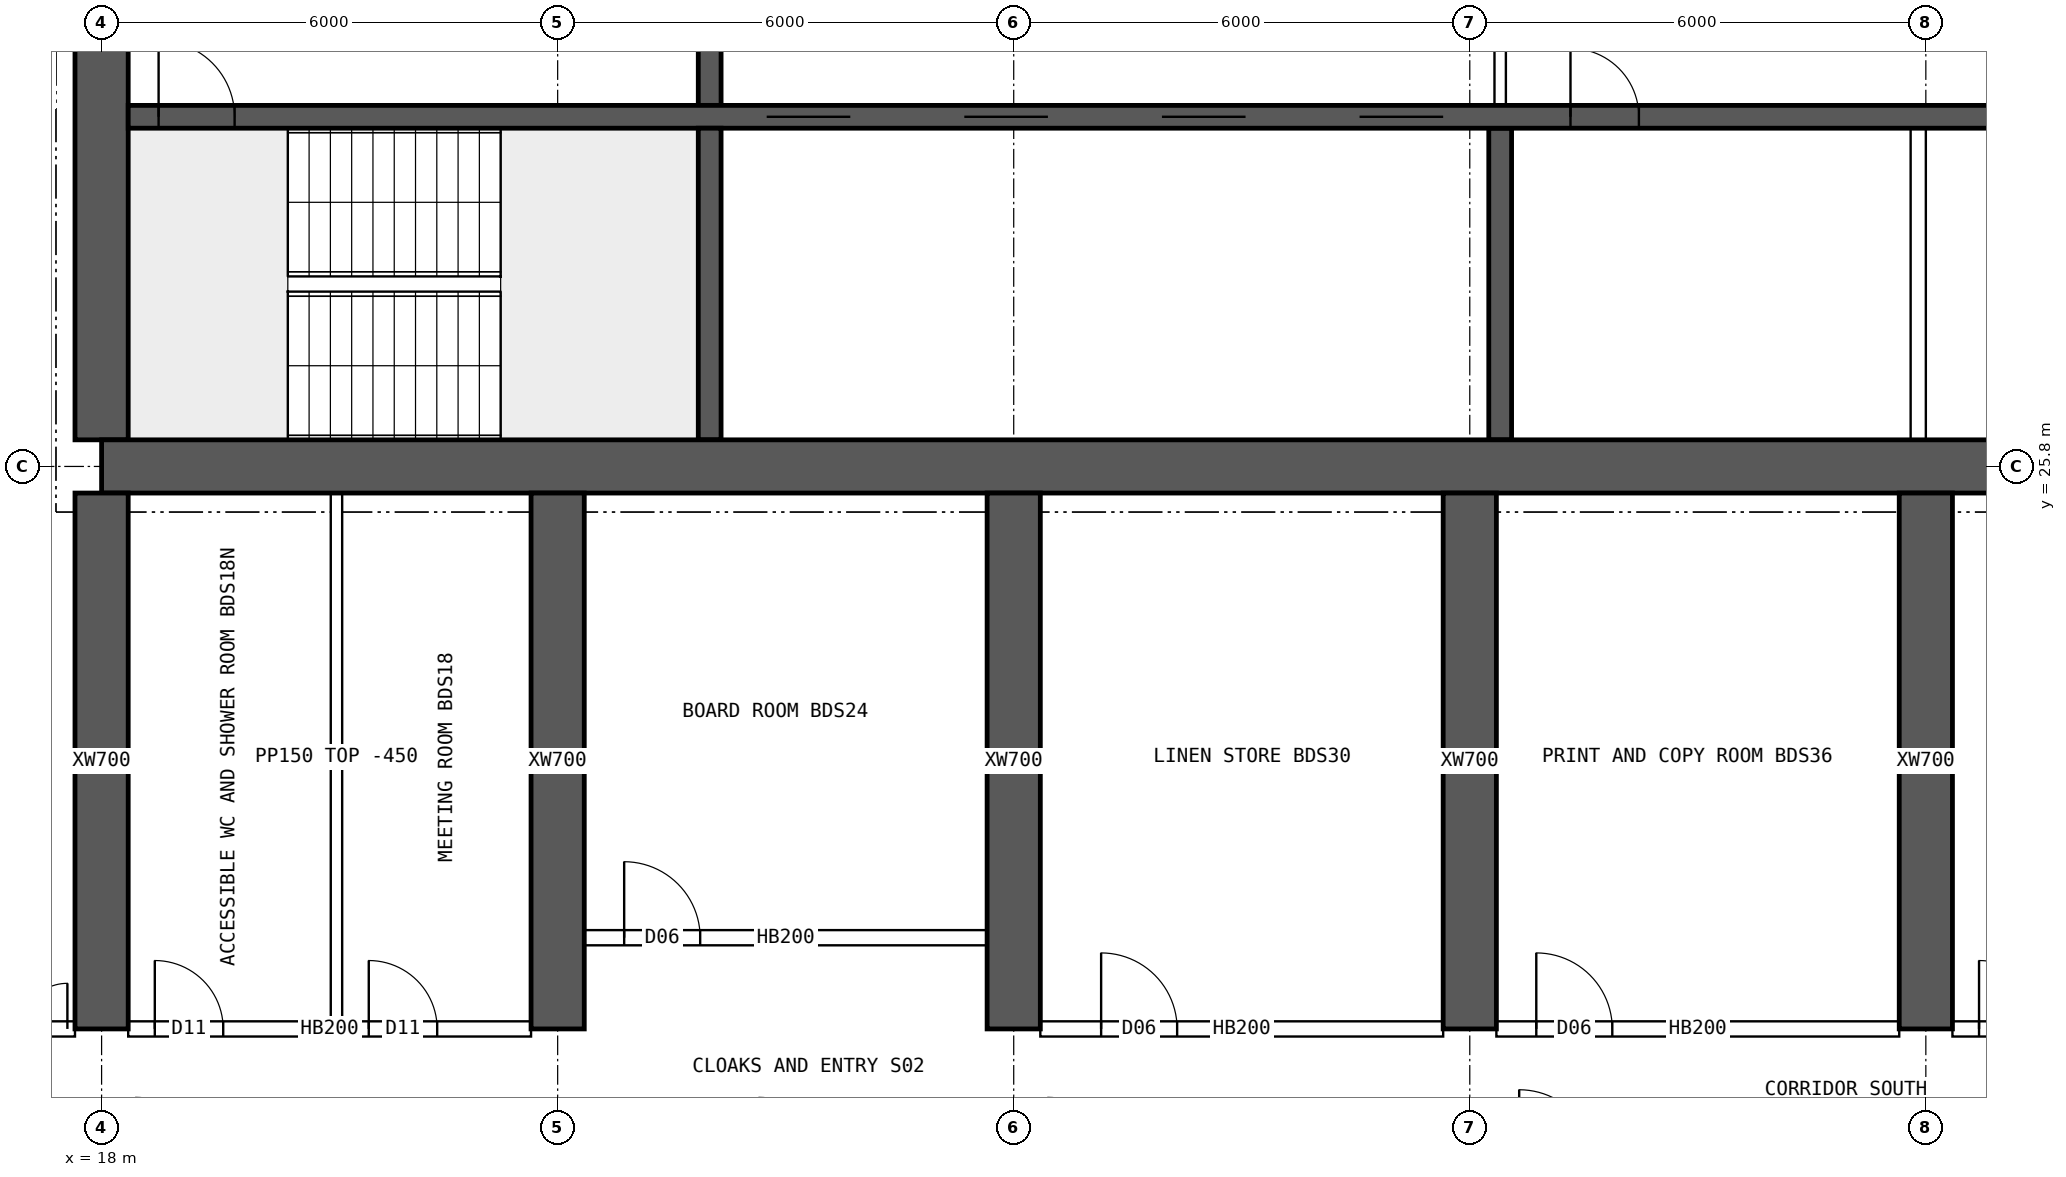
"""IFC4 building model, lengths in metres.
Left out: names, types, materials, properties, quantities, classifications, styles, units other than length and angle.
Written with IfcOpenShell. Run it as: python <this file> out.ifc"""

import sys

from ifc_helpers import new_model, si_unit, direction, frame, frame_2d, origin, place, context, subcontext, project, spatial, rectangle, extrude, element, fill, save


model = new_model("IFC4")
c1 = context("Model", 3, precision=1e-05, world=origin(), true_north=direction((0.0, 1.0)))
c2 = subcontext(c1, "Body", "Model", "MODEL_VIEW")
j1 = project(units=[si_unit("LENGTHUNIT", "METRE"), si_unit("PLANEANGLEUNIT", "RADIAN")], contexts=[c1])
p1 = place(None, origin())
s1 = spatial("IfcSite", under=j1, at=p1, CompositionType="ELEMENT")
p2 = place(p1, origin())
s2 = spatial("IfcBuilding", under=s1, at=p2, CompositionType="ELEMENT")
p3 = place(p2, frame((0.0, 0.0, 212.8)))
s3 = spatial("IfcBuildingStorey", under=s2, at=p3, CompositionType="ELEMENT", Elevation=212.8)
p4 = place(p3, frame((18.0, 25.8, 0.0), z_axis=(0.0, 0.0, 1.0), x_axis=(1.0, 0.0, 0.0)))
e1 = element("IfcWall", 1, at=p4, inside=s3, PredefinedType="SHEAR", context=c2, shape_type="SweptSolid", body=[
    extrude(rectangle(XDim=48.0, YDim=0.7, at=frame_2d((24.0, 0.0))), origin(), (0.0, 0.0, 1.0), 3.75),
])
p5 = place(p3, frame((18.0, 26.15, 0.0), z_axis=(0.0, 0.0, 1.0), x_axis=(0.0, 1.0, 0.0)))
e2 = element("IfcWall", 2, at=p5, inside=s3, PredefinedType="SHEAR", context=c2, shape_type="SweptSolid", body=[
    extrude(rectangle(XDim=11.7, YDim=0.7, at=frame_2d((5.85, 0.0))), origin(), (0.0, 0.0, 1.0), 3.75),
])
p6 = place(p5, frame((5.15, 0.0, 0.0)))
e3 = element("IfcOpeningElement", 3, at=p6, cuts=e2, PredefinedType="OPENING", context=c2, shape_type="SweptSolid", body=[
    extrude(rectangle(XDim=1.2, YDim=2.1, at=frame_2d((0.6, 1.05))), frame((0.0, 0.36, 0.0), z_axis=(0.0, -1.0, 0.0), x_axis=(1.0, 0.0, 0.0)), (0.0, 0.0, 1.0), 0.72),
])
p7 = place(p3, frame((18.35, 30.4, 0.0), z_axis=(0.0, 0.0, 1.0), x_axis=(1.0, 0.0, 0.0)))
e4 = element("IfcWall", 4, at=p7, inside=s3, PredefinedType="SHEAR", context=c2, shape_type="SweptSolid", body=[
    extrude(rectangle(XDim=47.3, YDim=0.3, at=frame_2d((23.65, 0.0))), origin(), (0.0, 0.0, 1.0), 3.75),
])
p8 = place(p7, frame((0.4, 0.0, 0.0)))
e5 = element("IfcOpeningElement", 5, at=p8, cuts=e4, PredefinedType="OPENING", context=c2, shape_type="SweptSolid", body=[
    extrude(rectangle(XDim=1.0, YDim=2.1, at=frame_2d((0.5, 1.05))), frame((0.0, 0.16, 0.0), z_axis=(0.0, -1.0, 0.0), x_axis=(1.0, 0.0, 0.0)), (0.0, 0.0, 1.0), 0.32),
])
p9 = place(p7, frame((45.9, 0.0, 0.0)))
e6 = element("IfcOpeningElement", 6, at=p9, cuts=e4, PredefinedType="OPENING", context=c2, shape_type="SweptSolid", body=[
    extrude(rectangle(XDim=1.0, YDim=2.1, at=frame_2d((0.5, 1.05))), frame((0.0, 0.16, 0.0), z_axis=(0.0, -1.0, 0.0), x_axis=(1.0, 0.0, 0.0)), (0.0, 0.0, 1.0), 0.32),
])
p10 = place(p7, frame((8.4, 0.0, 0.0)))
e7 = element("IfcOpeningElement", 7, at=p10, cuts=e4, PredefinedType="OPENING", context=c2, shape_type="SweptSolid", body=[
    extrude(rectangle(XDim=1.1, YDim=2.1, at=frame_2d((0.55, 1.05))), frame((0.0, 0.16, 0.0), z_axis=(0.0, -1.0, 0.0), x_axis=(1.0, 0.0, 0.0)), (0.0, 0.0, 1.0), 0.32),
])
p11 = place(p7, frame((11.0, 0.0, 0.0)))
e8 = element("IfcOpeningElement", 8, at=p11, cuts=e4, PredefinedType="OPENING", context=c2, shape_type="SweptSolid", body=[
    extrude(rectangle(XDim=1.1, YDim=2.1, at=frame_2d((0.55, 1.05))), frame((0.0, 0.16, 0.0), z_axis=(0.0, -1.0, 0.0), x_axis=(1.0, 0.0, 0.0)), (0.0, 0.0, 1.0), 0.32),
])
p12 = place(p7, frame((13.6, 0.0, 0.0)))
e9 = element("IfcOpeningElement", 9, at=p12, cuts=e4, PredefinedType="OPENING", context=c2, shape_type="SweptSolid", body=[
    extrude(rectangle(XDim=1.1, YDim=2.1, at=frame_2d((0.55, 1.05))), frame((0.0, 0.16, 0.0), z_axis=(0.0, -1.0, 0.0), x_axis=(1.0, 0.0, 0.0)), (0.0, 0.0, 1.0), 0.32),
])
p13 = place(p7, frame((16.2, 0.0, 0.0)))
e10 = element("IfcOpeningElement", 10, at=p13, cuts=e4, PredefinedType="OPENING", context=c2, shape_type="SweptSolid", body=[
    extrude(rectangle(XDim=1.1, YDim=2.1, at=frame_2d((0.55, 1.05))), frame((0.0, 0.16, 0.0), z_axis=(0.0, -1.0, 0.0), x_axis=(1.0, 0.0, 0.0)), (0.0, 0.0, 1.0), 0.32),
])
p14 = place(p7, frame((18.975, 0.0, 0.0)))
e11 = element("IfcOpeningElement", 11, at=p14, cuts=e4, PredefinedType="OPENING", context=c2, shape_type="SweptSolid", body=[
    extrude(rectangle(XDim=0.9, YDim=2.1, at=frame_2d((0.45, 1.05))), frame((0.0, 0.16, 0.0), z_axis=(0.0, -1.0, 0.0), x_axis=(1.0, 0.0, 0.0)), (0.0, 0.0, 1.0), 0.32),
])
p15 = place(p7, frame((30.267, 0.0, 0.0)))
e12 = element("IfcOpeningElement", 12, at=p15, cuts=e4, PredefinedType="OPENING", context=c2, shape_type="SweptSolid", body=[
    extrude(rectangle(XDim=1.1, YDim=2.1, at=frame_2d((0.55, 1.05))), frame((0.0, 0.16, 0.0), z_axis=(0.0, -1.0, 0.0), x_axis=(1.0, 0.0, 0.0)), (0.0, 0.0, 1.0), 0.32),
])
p16 = place(p7, frame((33.8, 0.0, 0.0)))
e13 = element("IfcOpeningElement", 13, at=p16, cuts=e4, PredefinedType="OPENING", context=c2, shape_type="SweptSolid", body=[
    extrude(rectangle(XDim=1.1, YDim=2.1, at=frame_2d((0.55, 1.05))), frame((0.0, 0.16, 0.0), z_axis=(0.0, -1.0, 0.0), x_axis=(1.0, 0.0, 0.0)), (0.0, 0.0, 1.0), 0.32),
])
p17 = place(p7, frame((37.333, 0.0, 0.0)))
e14 = element("IfcOpeningElement", 14, at=p17, cuts=e4, PredefinedType="OPENING", context=c2, shape_type="SweptSolid", body=[
    extrude(rectangle(XDim=1.1, YDim=2.1, at=frame_2d((0.55, 1.05))), frame((0.0, 0.16, 0.0), z_axis=(0.0, -1.0, 0.0), x_axis=(1.0, 0.0, 0.0)), (0.0, 0.0, 1.0), 0.32),
])
p18 = place(p3, frame((26.0, 26.15, 0.0), z_axis=(0.0, 0.0, 1.0), x_axis=(0.0, 1.0, 0.0)))
e15 = element("IfcWall", 15, at=p18, inside=s3, PredefinedType="SHEAR", context=c2, shape_type="SweptSolid", body=[
    extrude(rectangle(XDim=4.1, YDim=0.3, at=frame_2d((2.05, 0.0))), origin(), (0.0, 0.0, 1.0), 3.75),
])
p19 = place(p3, frame((26.0, 30.55, 0.0), z_axis=(0.0, 0.0, 1.0), x_axis=(0.0, 1.0, 0.0)))
e16 = element("IfcWall", 16, at=p19, inside=s3, PredefinedType="SHEAR", context=c2, shape_type="SweptSolid", body=[
    extrude(rectangle(XDim=3.9, YDim=0.3, at=frame_2d((1.95, 0.0))), origin(), (0.0, 0.0, 1.0), 3.75),
])
p20 = place(p19, frame((1.4, 0.0, 0.0)))
e17 = element("IfcOpeningElement", 17, at=p20, cuts=e16, PredefinedType="OPENING", context=c2, shape_type="SweptSolid", body=[
    extrude(rectangle(XDim=1.2, YDim=2.1, at=frame_2d((0.6, 1.05))), frame((0.0, 0.16, 0.0), z_axis=(0.0, -1.0, 0.0), x_axis=(1.0, 0.0, 0.0)), (0.0, 0.0, 1.0), 0.32),
])
p21 = place(p3, frame((36.4, 26.15, 0.0), z_axis=(0.0, 0.0, 1.0), x_axis=(0.0, 1.0, 0.0)))
e18 = element("IfcWall", 18, at=p21, inside=s3, PredefinedType="SHEAR", context=c2, shape_type="SweptSolid", body=[
    extrude(rectangle(XDim=4.1, YDim=0.3, at=frame_2d((2.05, 0.0))), origin(), (0.0, 0.0, 1.0), 3.75),
])
for number, where, z_axis, x_axis in (
    (19, (18.0, 18.4, 0.0), (0.0, 0.0, 1.0), (0.0, 1.0, 0.0)),
    (20, (24.0, 18.4, 0.0), (0.0, 0.0, 1.0), (0.0, 1.0, 0.0)),
    (21, (30.0, 18.4, 0.0), (0.0, 0.0, 1.0), (0.0, 1.0, 0.0)),
    (22, (36.0, 18.4, 0.0), (0.0, 0.0, 1.0), (0.0, 1.0, 0.0)),
    (23, (42.0, 18.4, 0.0), (0.0, 0.0, 1.0), (0.0, 1.0, 0.0)),
):
    element("IfcWall", number, at=place(p3, frame(where, z_axis=z_axis, x_axis=x_axis)), inside=s3, PredefinedType="SHEAR", context=c2, shape_type="SweptSolid", body=[
        extrude(rectangle(XDim=7.05, YDim=0.7, at=frame_2d((3.525, 0.0))), origin(), (0.0, 0.0, 1.0), 3.75),
    ])
p22 = place(p3, frame((36.4, 30.55, 0.0), z_axis=(0.0, 0.0, 1.0), x_axis=(0.0, 1.0, 0.0)))
e24 = element("IfcWall", 24, at=p22, inside=s3, PredefinedType="SOLIDWALL", context=c2, shape_type="SweptSolid", body=[
    extrude(rectangle(XDim=3.9, YDim=0.15, at=frame_2d((1.95, 0.0))), origin(), (0.0, 0.0, 1.0), 3.3),
])
p23 = place(p22, frame((1.15, 0.0, 0.0)))
e25 = element("IfcOpeningElement", 25, at=p23, cuts=e24, PredefinedType="OPENING", context=c2, shape_type="SweptSolid", body=[
    extrude(rectangle(XDim=1.6, YDim=2.1, at=frame_2d((0.8, 1.05))), frame((0.0, 0.085, 0.0), z_axis=(0.0, -1.0, 0.0), x_axis=(1.0, 0.0, 0.0)), (0.0, 0.0, 1.0), 0.17),
])
p24 = place(p3, frame((41.9, 26.15, 0.0), z_axis=(0.0, 0.0, 1.0), x_axis=(0.0, 1.0, 0.0)))
e26 = element("IfcWall", 26, at=p24, inside=s3, PredefinedType="SOLIDWALL", context=c2, shape_type="SweptSolid", body=[
    extrude(rectangle(XDim=4.1, YDim=0.2, at=frame_2d((2.05, 0.0))), origin(), (0.0, 0.0, 1.0), 3.3),
])
p25 = place(p3, frame((15.6, 18.4, 0.0), z_axis=(0.0, 0.0, 1.0), x_axis=(1.0, 0.0, 0.0)))
e27 = element("IfcWall", 27, at=p25, inside=s3, PredefinedType="SOLIDWALL", context=c2, shape_type="SweptSolid", body=[
    extrude(rectangle(XDim=2.05, YDim=0.2, at=frame_2d((1.025, 0.0))), origin(), (0.0, 0.0, 1.0), 3.3),
])
p26 = place(p25, frame((0.75, 0.0, 0.0)))
e28 = element("IfcOpeningElement", 28, at=p26, cuts=e27, PredefinedType="OPENING", context=c2, shape_type="SweptSolid", body=[
    extrude(rectangle(XDim=1.2, YDim=2.1, at=frame_2d((0.6, 1.05))), frame((0.0, 0.11, 0.0), z_axis=(0.0, -1.0, 0.0), x_axis=(1.0, 0.0, 0.0)), (0.0, 0.0, 1.0), 0.22),
])
p27 = place(p3, frame((18.35, 18.4, 0.0), z_axis=(0.0, 0.0, 1.0), x_axis=(1.0, 0.0, 0.0)))
e29 = element("IfcWall", 29, at=p27, inside=s3, PredefinedType="SOLIDWALL", context=c2, shape_type="SweptSolid", body=[
    extrude(rectangle(XDim=5.3, YDim=0.2, at=frame_2d((2.65, 0.0))), origin(), (0.0, 0.0, 1.0), 3.3),
])
p28 = place(p27, frame((0.35, 0.0, 0.0)))
e30 = element("IfcOpeningElement", 30, at=p28, cuts=e29, PredefinedType="OPENING", context=c2, shape_type="SweptSolid", body=[
    extrude(rectangle(XDim=0.9, YDim=2.1, at=frame_2d((0.45, 1.05))), frame((0.0, 0.11, 0.0), z_axis=(0.0, -1.0, 0.0), x_axis=(1.0, 0.0, 0.0)), (0.0, 0.0, 1.0), 0.22),
])
p29 = place(p27, frame((3.165, 0.0, 0.0)))
e31 = element("IfcOpeningElement", 31, at=p29, cuts=e29, PredefinedType="OPENING", context=c2, shape_type="SweptSolid", body=[
    extrude(rectangle(XDim=0.9, YDim=2.1, at=frame_2d((0.45, 1.05))), frame((0.0, 0.11, 0.0), z_axis=(0.0, -1.0, 0.0), x_axis=(1.0, 0.0, 0.0)), (0.0, 0.0, 1.0), 0.22),
])
p30 = place(p3, frame((30.35, 18.4, 0.0), z_axis=(0.0, 0.0, 1.0), x_axis=(1.0, 0.0, 0.0)))
e32 = element("IfcWall", 32, at=p30, inside=s3, PredefinedType="SOLIDWALL", context=c2, shape_type="SweptSolid", body=[
    extrude(rectangle(XDim=5.3, YDim=0.2, at=frame_2d((2.65, 0.0))), origin(), (0.0, 0.0, 1.0), 3.3),
])
p31 = place(p30, frame((0.8, 0.0, 0.0)))
e33 = element("IfcOpeningElement", 33, at=p31, cuts=e32, PredefinedType="OPENING", context=c2, shape_type="SweptSolid", body=[
    extrude(rectangle(XDim=1.0, YDim=2.1, at=frame_2d((0.5, 1.05))), frame((0.0, 0.11, 0.0), z_axis=(0.0, -1.0, 0.0), x_axis=(1.0, 0.0, 0.0)), (0.0, 0.0, 1.0), 0.22),
])
p32 = place(p3, frame((36.35, 18.4, 0.0), z_axis=(0.0, 0.0, 1.0), x_axis=(1.0, 0.0, 0.0)))
e34 = element("IfcWall", 34, at=p32, inside=s3, PredefinedType="SOLIDWALL", context=c2, shape_type="SweptSolid", body=[
    extrude(rectangle(XDim=5.3, YDim=0.2, at=frame_2d((2.65, 0.0))), origin(), (0.0, 0.0, 1.0), 3.3),
])
p33 = place(p32, frame((0.525, 0.0, 0.0)))
e35 = element("IfcOpeningElement", 35, at=p33, cuts=e34, PredefinedType="OPENING", context=c2, shape_type="SweptSolid", body=[
    extrude(rectangle(XDim=1.0, YDim=2.1, at=frame_2d((0.5, 1.05))), frame((0.0, 0.11, 0.0), z_axis=(0.0, -1.0, 0.0), x_axis=(1.0, 0.0, 0.0)), (0.0, 0.0, 1.0), 0.22),
])
p34 = place(p3, frame((42.35, 18.4, 0.0), z_axis=(0.0, 0.0, 1.0), x_axis=(1.0, 0.0, 0.0)))
e36 = element("IfcWall", 36, at=p34, inside=s3, PredefinedType="SOLIDWALL", context=c2, shape_type="SweptSolid", body=[
    extrude(rectangle(XDim=5.3, YDim=0.2, at=frame_2d((2.65, 0.0))), origin(), (0.0, 0.0, 1.0), 3.3),
])
p35 = place(p34, frame((0.35, 0.0, 0.0)))
e37 = element("IfcOpeningElement", 37, at=p35, cuts=e36, PredefinedType="OPENING", context=c2, shape_type="SweptSolid", body=[
    extrude(rectangle(XDim=0.9, YDim=2.1, at=frame_2d((0.45, 1.05))), frame((0.0, 0.11, 0.0), z_axis=(0.0, -1.0, 0.0), x_axis=(1.0, 0.0, 0.0)), (0.0, 0.0, 1.0), 0.22),
])
p36 = place(p34, frame((2.655, 0.0, 0.0)))
e38 = element("IfcOpeningElement", 38, at=p36, cuts=e36, PredefinedType="OPENING", context=c2, shape_type="SweptSolid", body=[
    extrude(rectangle(XDim=0.9, YDim=2.1, at=frame_2d((0.45, 1.05))), frame((0.0, 0.11, 0.0), z_axis=(0.0, -1.0, 0.0), x_axis=(1.0, 0.0, 0.0)), (0.0, 0.0, 1.0), 0.22),
])
p37 = place(p3, frame((21.09, 18.5, 0.0), z_axis=(0.0, 0.0, 1.0), x_axis=(0.0, 1.0, 0.0)))
e39 = element("IfcWall", 39, at=p37, inside=s3, PredefinedType="PARTITIONING", context=c2, shape_type="SweptSolid", body=[
    extrude(rectangle(XDim=6.95, YDim=0.15, at=frame_2d((3.475, 0.0))), origin(), (0.0, 0.0, 1.0), 3.3),
])
p38 = place(p3, frame((24.35, 19.6, 0.0), z_axis=(0.0, 0.0, 1.0), x_axis=(1.0, 0.0, 0.0)))
e40 = element("IfcWall", 40, at=p38, inside=s3, PredefinedType="SOLIDWALL", context=c2, shape_type="SweptSolid", body=[
    extrude(rectangle(XDim=5.3, YDim=0.2, at=frame_2d((2.65, 0.0))), origin(), (0.0, 0.0, 1.0), 3.3),
])
p39 = place(p38, frame((0.525, 0.0, 0.0)))
e41 = element("IfcOpeningElement", 41, at=p39, cuts=e40, PredefinedType="OPENING", context=c2, shape_type="SweptSolid", body=[
    extrude(rectangle(XDim=1.0, YDim=2.1, at=frame_2d((0.5, 1.05))), frame((0.0, 0.11, 0.0), z_axis=(0.0, -1.0, 0.0), x_axis=(1.0, 0.0, 0.0)), (0.0, 0.0, 1.0), 0.22),
])
p40 = place(p8, origin())
e42 = element("IfcDoor", 42, at=p40, inside=s3, OperationType="SINGLE_SWING_LEFT", PredefinedType="DOOR", context=c2, shape_type="SweptSolid", body=[
    extrude(rectangle(XDim=1.0, YDim=2.1, at=frame_2d((0.5, 1.05))), frame((0.0, 0.025, 0.0), z_axis=(0.0, -1.0, 0.0), x_axis=(1.0, 0.0, 0.0)), (0.0, 0.0, 1.0), 0.05),
])
fill(e5, e42)
p41 = place(p10, origin())
e43 = element("IfcDoor", 43, at=p41, inside=s3, OperationType="DOUBLE_DOOR_SLIDING", PredefinedType="DOOR", context=c2, shape_type="SweptSolid", body=[
    extrude(rectangle(XDim=1.1, YDim=2.1, at=frame_2d((0.55, 1.05))), frame((0.0, 0.025, 0.0), z_axis=(0.0, -1.0, 0.0), x_axis=(1.0, 0.0, 0.0)), (0.0, 0.0, 1.0), 0.05),
])
fill(e7, e43)
p42 = place(p11, origin())
e44 = element("IfcDoor", 44, at=p42, inside=s3, OperationType="DOUBLE_DOOR_SLIDING", PredefinedType="DOOR", context=c2, shape_type="SweptSolid", body=[
    extrude(rectangle(XDim=1.1, YDim=2.1, at=frame_2d((0.55, 1.05))), frame((0.0, 0.025, 0.0), z_axis=(0.0, -1.0, 0.0), x_axis=(1.0, 0.0, 0.0)), (0.0, 0.0, 1.0), 0.05),
])
fill(e8, e44)
p43 = place(p12, origin())
e45 = element("IfcDoor", 45, at=p43, inside=s3, OperationType="DOUBLE_DOOR_SLIDING", PredefinedType="DOOR", context=c2, shape_type="SweptSolid", body=[
    extrude(rectangle(XDim=1.1, YDim=2.1, at=frame_2d((0.55, 1.05))), frame((0.0, 0.025, 0.0), z_axis=(0.0, -1.0, 0.0), x_axis=(1.0, 0.0, 0.0)), (0.0, 0.0, 1.0), 0.05),
])
fill(e9, e45)
p44 = place(p13, origin())
e46 = element("IfcDoor", 46, at=p44, inside=s3, OperationType="DOUBLE_DOOR_SLIDING", PredefinedType="DOOR", context=c2, shape_type="SweptSolid", body=[
    extrude(rectangle(XDim=1.1, YDim=2.1, at=frame_2d((0.55, 1.05))), frame((0.0, 0.025, 0.0), z_axis=(0.0, -1.0, 0.0), x_axis=(1.0, 0.0, 0.0)), (0.0, 0.0, 1.0), 0.05),
])
fill(e10, e46)
p45 = place(p14, origin())
e47 = element("IfcDoor", 47, at=p45, inside=s3, OperationType="SINGLE_SWING_LEFT", PredefinedType="DOOR", context=c2, shape_type="SweptSolid", body=[
    extrude(rectangle(XDim=0.9, YDim=2.1, at=frame_2d((0.45, 1.05))), frame((0.0, 0.025, 0.0), z_axis=(0.0, -1.0, 0.0), x_axis=(1.0, 0.0, 0.0)), (0.0, 0.0, 1.0), 0.05),
])
fill(e11, e47)
p46 = place(p26, origin())
e48 = element("IfcDoor", 48, at=p46, inside=s3, OperationType="DOUBLE_DOOR_SINGLE_SWING", PredefinedType="DOOR", context=c2, shape_type="SweptSolid", body=[
    extrude(rectangle(XDim=1.2, YDim=2.1, at=frame_2d((0.6, 1.05))), frame((0.0, 0.025, 0.0), z_axis=(0.0, -1.0, 0.0), x_axis=(1.0, 0.0, 0.0)), (0.0, 0.0, 1.0), 0.05),
])
fill(e28, e48)
p47 = place(p28, origin())
e49 = element("IfcDoor", 49, at=p47, inside=s3, OperationType="SINGLE_SWING_LEFT", PredefinedType="DOOR", context=c2, shape_type="SweptSolid", body=[
    extrude(rectangle(XDim=0.9, YDim=2.1, at=frame_2d((0.45, 1.05))), frame((0.0, 0.025, 0.0), z_axis=(0.0, -1.0, 0.0), x_axis=(1.0, 0.0, 0.0)), (0.0, 0.0, 1.0), 0.05),
])
fill(e30, e49)
p48 = place(p29, origin())
e50 = element("IfcDoor", 50, at=p48, inside=s3, OperationType="SINGLE_SWING_LEFT", PredefinedType="DOOR", context=c2, shape_type="SweptSolid", body=[
    extrude(rectangle(XDim=0.9, YDim=2.1, at=frame_2d((0.45, 1.05))), frame((0.0, 0.025, 0.0), z_axis=(0.0, -1.0, 0.0), x_axis=(1.0, 0.0, 0.0)), (0.0, 0.0, 1.0), 0.05),
])
fill(e31, e50)
p49 = place(p39, origin())
e51 = element("IfcDoor", 51, at=p49, inside=s3, OperationType="SINGLE_SWING_LEFT", PredefinedType="DOOR", context=c2, shape_type="SweptSolid", body=[
    extrude(rectangle(XDim=1.0, YDim=2.1, at=frame_2d((0.5, 1.05))), frame((0.0, 0.025, 0.0), z_axis=(0.0, -1.0, 0.0), x_axis=(1.0, 0.0, 0.0)), (0.0, 0.0, 1.0), 0.05),
])
fill(e41, e51)
p50 = place(p31, origin())
e52 = element("IfcDoor", 52, at=p50, inside=s3, OperationType="SINGLE_SWING_LEFT", PredefinedType="DOOR", context=c2, shape_type="SweptSolid", body=[
    extrude(rectangle(XDim=1.0, YDim=2.1, at=frame_2d((0.5, 1.05))), frame((0.0, 0.025, 0.0), z_axis=(0.0, -1.0, 0.0), x_axis=(1.0, 0.0, 0.0)), (0.0, 0.0, 1.0), 0.05),
])
fill(e33, e52)
p51 = place(p33, origin())
e53 = element("IfcDoor", 53, at=p51, inside=s3, OperationType="SINGLE_SWING_LEFT", PredefinedType="DOOR", context=c2, shape_type="SweptSolid", body=[
    extrude(rectangle(XDim=1.0, YDim=2.1, at=frame_2d((0.5, 1.05))), frame((0.0, 0.025, 0.0), z_axis=(0.0, -1.0, 0.0), x_axis=(1.0, 0.0, 0.0)), (0.0, 0.0, 1.0), 0.05),
])
fill(e35, e53)
p52 = place(p35, origin())
e54 = element("IfcDoor", 54, at=p52, inside=s3, OperationType="SINGLE_SWING_LEFT", PredefinedType="DOOR", context=c2, shape_type="SweptSolid", body=[
    extrude(rectangle(XDim=0.9, YDim=2.1, at=frame_2d((0.45, 1.05))), frame((0.0, 0.025, 0.0), z_axis=(0.0, -1.0, 0.0), x_axis=(1.0, 0.0, 0.0)), (0.0, 0.0, 1.0), 0.05),
])
fill(e37, e54)
save(model, sys.argv[1])
